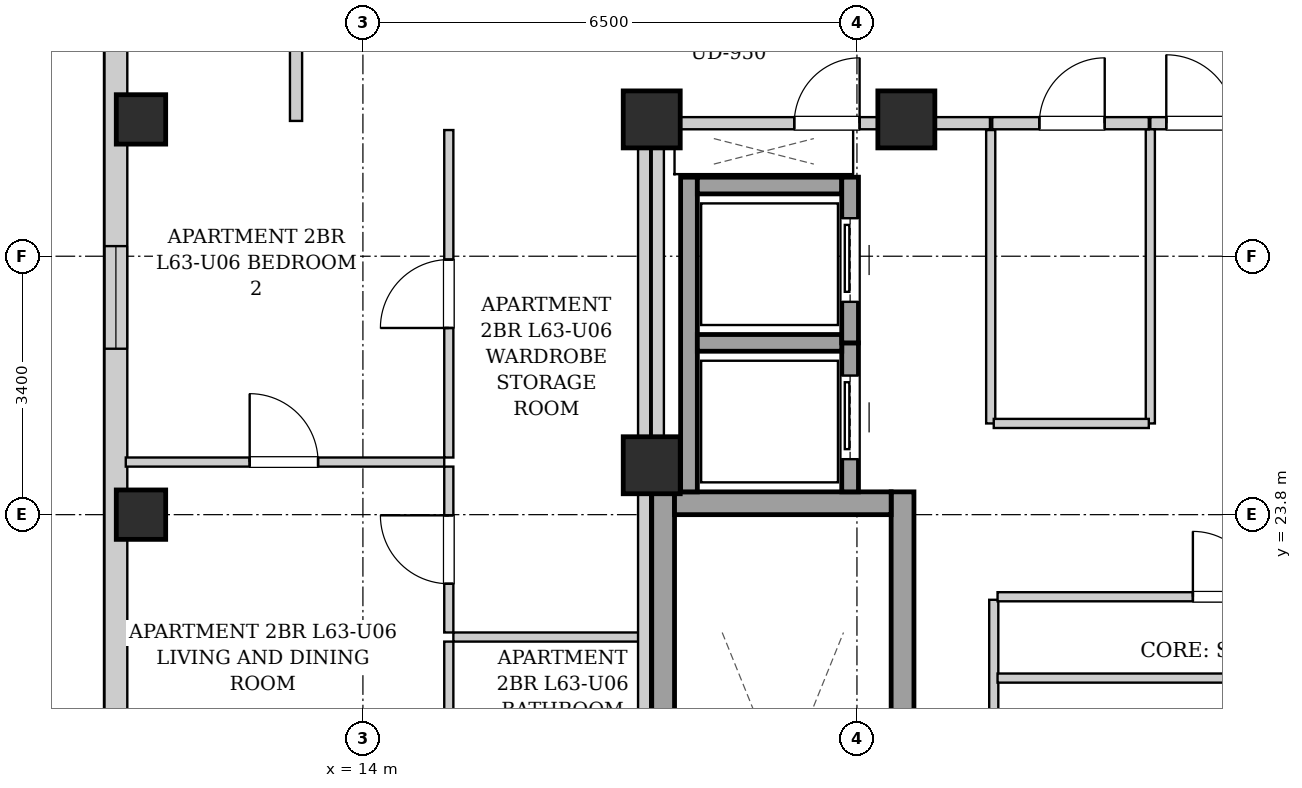
"""IFC4 building model, lengths in metres.
Left out: names, types, materials, properties, quantities, classifications, styles, units other than length and angle.
Written with IfcOpenShell. Run it as: python <this file> out.ifc"""

import sys

from ifc_helpers import new_model, si_unit, direction, frame, frame_2d, origin, origin_2d, place, context, subcontext, project, spatial, rectangle, extrude, element, fill, save


model = new_model("IFC4")
c1 = context("Model", 3, precision=1e-05, world=origin(), true_north=direction((0.0, 1.0)))
c2 = subcontext(c1, "Body", "Model", "MODEL_VIEW")
j1 = project(units=[si_unit("LENGTHUNIT", "METRE"), si_unit("PLANEANGLEUNIT", "RADIAN")], contexts=[c1])
p1 = place(None, origin())
s1 = spatial("IfcSite", under=j1, at=p1, CompositionType="ELEMENT")
p2 = place(p1, origin())
s2 = spatial("IfcBuilding", under=s1, at=p2, CompositionType="ELEMENT")
p3 = place(p2, frame((0.0, 0.0, 217.3)))
s3 = spatial("IfcBuildingStorey", under=s2, at=p3, CompositionType="ELEMENT", Elevation=217.3)
for number, where, z_axis, x_axis in (
    (1, (11.08, 23.8, 0.0), (0.0, 0.0, 1.0), (1.0, 0.0, 0.0)),
    (2, (11.08, 29.0, 0.0), (0.0, 0.0, 1.0), (1.0, 0.0, 0.0)),
):
    element("IfcColumn", number, at=place(p3, frame(where, z_axis=z_axis, x_axis=x_axis)), inside=s3, PredefinedType="COLUMN", context=c2, shape_type="SweptSolid", body=[
        extrude(rectangle(XDim=0.65, YDim=0.65, at=origin_2d()), origin(), (0.0, 0.0, 1.0), 3.4),
    ])
for number, where, z_axis, x_axis in (
    (3, (17.8, 29.0, 0.0), (0.0, 0.0, 1.0), (1.0, 0.0, 0.0)),
    (4, (21.15, 29.0, 0.0), (0.0, 0.0, 1.0), (1.0, 0.0, 0.0)),
    (5, (17.8, 24.45, 0.0), (0.0, 0.0, 1.0), (1.0, 0.0, 0.0)),
):
    element("IfcColumn", number, at=place(p3, frame(where, z_axis=z_axis, x_axis=x_axis)), inside=s3, PredefinedType="COLUMN", context=c2, shape_type="SweptSolid", body=[
        extrude(rectangle(XDim=0.75, YDim=0.75, at=origin_2d()), origin(), (0.0, 0.0, 1.0), 3.4),
    ])
p4 = place(p3, frame((10.75, 6.3, 0.0), z_axis=(0.0, 0.0, 1.0), x_axis=(0.0, 1.0, 0.0)))
e6 = element("IfcWall", 6, at=p4, inside=s3, PredefinedType="SOLIDWALL", context=c2, shape_type="SweptSolid", body=[
    extrude(rectangle(XDim=31.4, YDim=0.3, at=frame_2d((15.7, 0.0))), origin(), (0.0, 0.0, 1.0), 3.14),
])
p5 = place(p4, frame((1.504, 0.0, 0.55)))
e7 = element("IfcOpeningElement", 7, at=p5, cuts=e6, PredefinedType="OPENING", context=c2, shape_type="SweptSolid", body=[
    extrude(rectangle(XDim=1.35, YDim=1.2, at=frame_2d((0.675, 0.6))), frame((0.0, 0.16, 0.0), z_axis=(0.0, -1.0, 0.0), x_axis=(1.0, 0.0, 0.0)), (0.0, 0.0, 1.0), 0.32),
])
p6 = place(p4, frame((28.546, 0.0, 0.55)))
e8 = element("IfcOpeningElement", 8, at=p6, cuts=e6, PredefinedType="OPENING", context=c2, shape_type="SweptSolid", body=[
    extrude(rectangle(XDim=1.35, YDim=1.2, at=frame_2d((0.675, 0.6))), frame((0.0, 0.16, 0.0), z_axis=(0.0, -1.0, 0.0), x_axis=(1.0, 0.0, 0.0)), (0.0, 0.0, 1.0), 0.32),
])
p7 = place(p4, frame((10.367, 0.0, 0.55)))
e9 = element("IfcOpeningElement", 9, at=p7, cuts=e6, PredefinedType="OPENING", context=c2, shape_type="SweptSolid", body=[
    extrude(rectangle(XDim=1.35, YDim=1.2, at=frame_2d((0.675, 0.6))), frame((0.0, 0.16, 0.0), z_axis=(0.0, -1.0, 0.0), x_axis=(1.0, 0.0, 0.0)), (0.0, 0.0, 1.0), 0.32),
])
p8 = place(p4, frame((19.683, 0.0, 0.55)))
e10 = element("IfcOpeningElement", 10, at=p8, cuts=e6, PredefinedType="OPENING", context=c2, shape_type="SweptSolid", body=[
    extrude(rectangle(XDim=1.35, YDim=1.2, at=frame_2d((0.675, 0.6))), frame((0.0, 0.16, 0.0), z_axis=(0.0, -1.0, 0.0), x_axis=(1.0, 0.0, 0.0)), (0.0, 0.0, 1.0), 0.32),
])
for number, where, z_axis, x_axis in (
    (11, (17.95, 15.1, 0.0), (0.0, 0.0, 1.0), (0.0, 1.0, 0.0)),
    (12, (21.1, 15.1, 0.0), (0.0, 0.0, 1.0), (0.0, 1.0, 0.0)),
):
    element("IfcWall", number, at=place(p3, frame(where, z_axis=z_axis, x_axis=x_axis)), inside=s3, PredefinedType="SHEAR", context=c2, shape_type="SweptSolid", body=[
        extrude(rectangle(XDim=9.0, YDim=0.3, at=frame_2d((4.5, 0.0))), origin(), (0.0, 0.0, 1.0), 3.14),
    ])
p9 = place(p3, frame((18.1, 23.95, 0.0), z_axis=(0.0, 0.0, 1.0), x_axis=(1.0, 0.0, 0.0)))
e13 = element("IfcWall", 13, at=p9, inside=s3, PredefinedType="SHEAR", context=c2, shape_type="SweptSolid", body=[
    extrude(rectangle(XDim=2.85, YDim=0.3, at=frame_2d((1.425, 0.0))), origin(), (0.0, 0.0, 1.0), 3.14),
])
p10 = place(p3, frame((18.29, 24.1, 0.0), z_axis=(0.0, 0.0, 1.0), x_axis=(0.0, 1.0, 0.0)))
e14 = element("IfcWall", 14, at=p10, inside=s3, PredefinedType="SHEAR", context=c2, shape_type="SweptSolid", body=[
    extrude(rectangle(XDim=4.14, YDim=0.22, at=frame_2d((2.07, 0.0))), origin(), (0.0, 0.0, 1.0), 3.14),
])
p11 = place(p3, frame((20.41, 24.1, 0.0), z_axis=(0.0, 0.0, 1.0), x_axis=(0.0, 1.0, 0.0)))
e15 = element("IfcWall", 15, at=p11, inside=s3, PredefinedType="SHEAR", context=c2, shape_type="SweptSolid", body=[
    extrude(rectangle(XDim=1.96, YDim=0.22, at=frame_2d((0.98, 0.0))), origin(), (0.0, 0.0, 1.0), 3.14),
])
p12 = place(p11, frame((0.43, 0.0, 0.0)))
e16 = element("IfcOpeningElement", 16, at=p12, cuts=e15, PredefinedType="OPENING", context=c2, shape_type="SweptSolid", body=[
    extrude(rectangle(XDim=1.1, YDim=2.15, at=frame_2d((0.55, 1.075))), frame((0.0, 0.12, 0.0), z_axis=(0.0, -1.0, 0.0), x_axis=(1.0, 0.0, 0.0)), (0.0, 0.0, 1.0), 0.24),
])
for number, where, z_axis, x_axis in (
    (17, (18.4, 26.06, 0.0), (0.0, 0.0, 1.0), (1.0, 0.0, 0.0)),
    (18, (18.4, 28.13, 0.0), (0.0, 0.0, 1.0), (1.0, 0.0, 0.0)),
):
    element("IfcWall", number, at=place(p3, frame(where, z_axis=z_axis, x_axis=x_axis)), inside=s3, PredefinedType="SHEAR", context=c2, shape_type="SweptSolid", body=[
        extrude(rectangle(XDim=1.9, YDim=0.22, at=frame_2d((0.95, 0.0))), origin(), (0.0, 0.0, 1.0), 3.14),
    ])
p13 = place(p3, frame((20.41, 26.06, 0.0), z_axis=(0.0, 0.0, 1.0), x_axis=(0.0, 1.0, 0.0)))
e19 = element("IfcWall", 19, at=p13, inside=s3, PredefinedType="SHEAR", context=c2, shape_type="SweptSolid", body=[
    extrude(rectangle(XDim=2.18, YDim=0.22, at=frame_2d((1.09, 0.0))), origin(), (0.0, 0.0, 1.0), 3.14),
])
p14 = place(p13, frame((0.54, 0.0, 0.0)))
e20 = element("IfcOpeningElement", 20, at=p14, cuts=e19, PredefinedType="OPENING", context=c2, shape_type="SweptSolid", body=[
    extrude(rectangle(XDim=1.1, YDim=2.15, at=frame_2d((0.55, 1.075))), frame((0.0, 0.12, 0.0), z_axis=(0.0, -1.0, 0.0), x_axis=(1.0, 0.0, 0.0)), (0.0, 0.0, 1.0), 0.24),
])
p15 = place(p3, frame((17.88, 24.12, 0.0), z_axis=(0.0, 0.0, 1.0), x_axis=(0.0, 1.0, 0.0)))
e21 = element("IfcWall", 21, at=p15, inside=s3, PredefinedType="PARTITIONING", context=c2, shape_type="SweptSolid", body=[
    extrude(rectangle(XDim=4.76, YDim=0.16, at=frame_2d((2.38, 0.0))), origin(), (0.0, 0.0, 1.0), 2.475),
])
p16 = place(p3, frame((24.36, 28.95, 0.0), z_axis=(0.0, 0.0, 1.0), x_axis=(1.0, 0.0, 0.0)))
e22 = element("IfcWall", 22, at=p16, inside=s3, PredefinedType="PARTITIONING", context=c2, shape_type="SweptSolid", body=[
    extrude(rectangle(XDim=1.32, YDim=0.16, at=frame_2d((0.66, 0.0))), origin(), (0.0, 0.0, 1.0), 2.668),
])
p17 = place(p16, frame((0.21, 0.0, 0.0)))
e23 = element("IfcOpeningElement", 23, at=p17, cuts=e22, PredefinedType="OPENING", context=c2, shape_type="SweptSolid", body=[
    extrude(rectangle(XDim=0.9, YDim=2.05, at=frame_2d((0.45, 1.025))), frame((0.0, 0.09, 0.0), z_axis=(0.0, -1.0, 0.0), x_axis=(1.0, 0.0, 0.0)), (0.0, 0.0, 1.0), 0.18),
])
p18 = place(p3, frame((17.96, 28.95, 0.0), z_axis=(0.0, 0.0, 1.0), x_axis=(1.0, 0.0, 0.0)))
e24 = element("IfcWall", 24, at=p18, inside=s3, PredefinedType="PARTITIONING", context=c2, shape_type="SweptSolid", body=[
    extrude(rectangle(XDim=4.29, YDim=0.16, at=frame_2d((2.145, 0.0))), origin(), (0.0, 0.0, 1.0), 2.668),
])
p19 = place(p18, frame((1.715, 0.0, 0.0)))
e25 = element("IfcOpeningElement", 25, at=p19, cuts=e24, PredefinedType="OPENING", context=c2, shape_type="SweptSolid", body=[
    extrude(rectangle(XDim=0.86, YDim=2.05, at=frame_2d((0.43, 1.025))), frame((0.0, 0.09, 0.0), z_axis=(0.0, -1.0, 0.0), x_axis=(1.0, 0.0, 0.0)), (0.0, 0.0, 1.0), 0.18),
])
p20 = place(p3, frame((24.36, 25.0, 0.0), z_axis=(0.0, 0.0, 1.0), x_axis=(0.0, 1.0, 0.0)))
e26 = element("IfcWall", 26, at=p20, inside=s3, PredefinedType="PARTITIONING", context=c2, shape_type="SweptSolid", body=[
    extrude(rectangle(XDim=3.87, YDim=0.12, at=frame_2d((1.935, 0.0))), origin(), (0.0, 0.0, 1.0), 3.14),
])
p21 = place(p3, frame((22.26, 25.0, 0.0), z_axis=(0.0, 0.0, 1.0), x_axis=(0.0, 1.0, 0.0)))
e27 = element("IfcWall", 27, at=p21, inside=s3, PredefinedType="PARTITIONING", context=c2, shape_type="SweptSolid", body=[
    extrude(rectangle(XDim=3.86, YDim=0.12, at=frame_2d((1.93, 0.0))), origin(), (0.0, 0.0, 1.0), 3.14),
])
p22 = place(p3, frame((22.3, 25.0, 0.0), z_axis=(0.0, 0.0, 1.0), x_axis=(1.0, 0.0, 0.0)))
e28 = element("IfcWall", 28, at=p22, inside=s3, PredefinedType="PARTITIONING", context=c2, shape_type="SweptSolid", body=[
    extrude(rectangle(XDim=2.04, YDim=0.12, at=frame_2d((1.02, 0.0))), origin(), (0.0, 0.0, 1.0), 3.14),
])
p23 = place(p3, frame((22.28, 28.95, 0.0), z_axis=(0.0, 0.0, 1.0), x_axis=(1.0, 0.0, 0.0)))
e29 = element("IfcWall", 29, at=p23, inside=s3, PredefinedType="PARTITIONING", context=c2, shape_type="SweptSolid", body=[
    extrude(rectangle(XDim=2.06, YDim=0.16, at=frame_2d((1.03, 0.0))), origin(), (0.0, 0.0, 1.0), 2.668),
])
p24 = place(p23, frame((0.62, 0.0, 0.0)))
e30 = element("IfcOpeningElement", 30, at=p24, cuts=e29, PredefinedType="OPENING", context=c2, shape_type="SweptSolid", body=[
    extrude(rectangle(XDim=0.86, YDim=2.05, at=frame_2d((0.43, 1.025))), frame((0.0, 0.09, 0.0), z_axis=(0.0, -1.0, 0.0), x_axis=(1.0, 0.0, 0.0)), (0.0, 0.0, 1.0), 0.18),
])
p25 = place(p3, frame((22.3, 20.62, 0.0), z_axis=(0.0, 0.0, 1.0), x_axis=(0.0, 1.0, 0.0)))
e31 = element("IfcWall", 31, at=p25, inside=s3, PredefinedType="PARTITIONING", context=c2, shape_type="SweptSolid", body=[
    extrude(rectangle(XDim=2.06, YDim=0.12, at=frame_2d((1.03, 0.0))), origin(), (0.0, 0.0, 1.0), 3.14),
])
p26 = place(p3, frame((22.35, 21.65, 0.0), z_axis=(0.0, 0.0, 1.0), x_axis=(1.0, 0.0, 0.0)))
e32 = element("IfcWall", 32, at=p26, inside=s3, PredefinedType="PARTITIONING", context=c2, shape_type="SweptSolid", body=[
    extrude(rectangle(XDim=5.79, YDim=0.12, at=frame_2d((2.895, 0.0))), origin(), (0.0, 0.0, 1.0), 3.14),
])
p27 = place(p3, frame((22.35, 22.72, 0.0), z_axis=(0.0, 0.0, 1.0), x_axis=(1.0, 0.0, 0.0)))
e33 = element("IfcWall", 33, at=p27, inside=s3, PredefinedType="PARTITIONING", context=c2, shape_type="SweptSolid", body=[
    extrude(rectangle(XDim=7.27, YDim=0.12, at=frame_2d((3.635, 0.0))), origin(), (0.0, 0.0, 1.0), 3.14),
])
p28 = place(p27, frame((2.57, 0.0, 0.0)))
e34 = element("IfcOpeningElement", 34, at=p28, cuts=e33, PredefinedType="OPENING", context=c2, shape_type="SweptSolid", body=[
    extrude(rectangle(XDim=0.86, YDim=2.05, at=frame_2d((0.43, 1.025))), frame((0.0, 0.07, 0.0), z_axis=(0.0, -1.0, 0.0), x_axis=(1.0, 0.0, 0.0)), (0.0, 0.0, 1.0), 0.14),
])
p29 = place(p27, frame((6.06, 0.0, 0.0)))
e35 = element("IfcOpeningElement", 35, at=p29, cuts=e33, PredefinedType="OPENING", context=c2, shape_type="SweptSolid", body=[
    extrude(rectangle(XDim=0.86, YDim=2.05, at=frame_2d((0.43, 1.025))), frame((0.0, 0.07, 0.0), z_axis=(0.0, -1.0, 0.0), x_axis=(1.0, 0.0, 0.0)), (0.0, 0.0, 1.0), 0.14),
])
p30 = place(p3, frame((13.12, 28.98, 0.0), z_axis=(0.0, 0.0, 1.0), x_axis=(0.0, 1.0, 0.0)))
e36 = element("IfcWall", 36, at=p30, inside=s3, PredefinedType="PARTITIONING", context=c2, shape_type="SweptSolid", body=[
    extrude(rectangle(XDim=1.58, YDim=0.16, at=frame_2d((0.79, 0.0))), origin(), (0.0, 0.0, 1.0), 3.14),
])
p31 = place(p3, frame((15.19, 22.19, 0.0), z_axis=(0.0, 0.0, 1.0), x_axis=(1.0, 0.0, 0.0)))
e37 = element("IfcWall", 37, at=p31, inside=s3, PredefinedType="PARTITIONING", context=c2, shape_type="SweptSolid", body=[
    extrude(rectangle(XDim=2.45, YDim=0.12, at=frame_2d((1.225, 0.0))), origin(), (0.0, 0.0, 1.0), 3.14),
])
p32 = place(p3, frame((15.13, 22.25, 0.0), z_axis=(0.0, 0.0, 1.0), x_axis=(0.0, 1.0, 0.0)))
e38 = element("IfcWall", 38, at=p32, inside=s3, PredefinedType="PARTITIONING", context=c2, shape_type="SweptSolid", body=[
    extrude(rectangle(XDim=2.182, YDim=0.12, at=frame_2d((1.091, 0.0))), origin(), (0.0, 0.0, 1.0), 3.14),
])
p33 = place(p32, frame((0.641, 0.0, 0.0)))
e39 = element("IfcOpeningElement", 39, at=p33, cuts=e38, PredefinedType="OPENING", context=c2, shape_type="SweptSolid", body=[
    extrude(rectangle(XDim=0.9, YDim=2.05, at=frame_2d((0.45, 1.025))), frame((0.0, 0.07, 0.0), z_axis=(0.0, -1.0, 0.0), x_axis=(1.0, 0.0, 0.0)), (0.0, 0.0, 1.0), 0.14),
])
p34 = place(p3, frame((15.13, 24.552, 0.0), z_axis=(0.0, 0.0, 1.0), x_axis=(0.0, 1.0, 0.0)))
e40 = element("IfcWall", 40, at=p34, inside=s3, PredefinedType="PARTITIONING", context=c2, shape_type="SweptSolid", body=[
    extrude(rectangle(XDim=4.308, YDim=0.12, at=frame_2d((2.154, 0.0))), origin(), (0.0, 0.0, 1.0), 3.14),
])
p35 = place(p34, frame((1.704, 0.0, 0.0)))
e41 = element("IfcOpeningElement", 41, at=p35, cuts=e40, PredefinedType="OPENING", context=c2, shape_type="SweptSolid", body=[
    extrude(rectangle(XDim=0.9, YDim=2.05, at=frame_2d((0.45, 1.025))), frame((0.0, 0.07, 0.0), z_axis=(0.0, -1.0, 0.0), x_axis=(1.0, 0.0, 0.0)), (0.0, 0.0, 1.0), 0.14),
])
p36 = place(p3, frame((15.13, 19.83, 0.0), z_axis=(0.0, 0.0, 1.0), x_axis=(0.0, 1.0, 0.0)))
e42 = element("IfcWall", 42, at=p36, inside=s3, PredefinedType="PARTITIONING", context=c2, shape_type="SweptSolid", body=[
    extrude(rectangle(XDim=2.3, YDim=0.12, at=frame_2d((1.15, 0.0))), origin(), (0.0, 0.0, 1.0), 3.14),
])
p37 = place(p3, frame((10.88, 24.492, 0.0), z_axis=(0.0, 0.0, 1.0), x_axis=(1.0, 0.0, 0.0)))
e43 = element("IfcWall", 43, at=p37, inside=s3, PredefinedType="PARTITIONING", context=c2, shape_type="SweptSolid", body=[
    extrude(rectangle(XDim=4.19, YDim=0.12, at=frame_2d((2.095, 0.0))), origin(), (0.0, 0.0, 1.0), 2.878),
])
p38 = place(p37, frame((1.63, 0.0, 0.0)))
e44 = element("IfcOpeningElement", 44, at=p38, cuts=e43, PredefinedType="OPENING", context=c2, shape_type="SweptSolid", body=[
    extrude(rectangle(XDim=0.9, YDim=2.05, at=frame_2d((0.45, 1.025))), frame((0.0, 0.07, 0.0), z_axis=(0.0, -1.0, 0.0), x_axis=(1.0, 0.0, 0.0)), (0.0, 0.0, 1.0), 0.14),
])
p39 = place(p3, frame((17.7, 15.02, 0.0), z_axis=(0.0, 0.0, 1.0), x_axis=(0.0, 1.0, 0.0)))
e45 = element("IfcWall", 45, at=p39, inside=s3, PredefinedType="PARTITIONING", context=c2, shape_type="SweptSolid", body=[
    extrude(rectangle(XDim=13.98, YDim=0.16, at=frame_2d((6.99, 0.0))), origin(), (0.0, 0.0, 1.0), 2.475),
])
p40 = place(p12, origin())
e46 = element("IfcDoor", 46, at=p40, inside=s3, OperationType="SLIDING_TO_LEFT", PredefinedType="DOOR", context=c2, shape_type="SweptSolid", body=[
    extrude(rectangle(XDim=1.1, YDim=2.15, at=frame_2d((0.55, 1.075))), frame((0.0, 0.025, 0.0), z_axis=(0.0, -1.0, 0.0), x_axis=(1.0, 0.0, 0.0)), (0.0, 0.0, 1.0), 0.05),
])
fill(e16, e46)
p41 = place(p14, origin())
e47 = element("IfcDoor", 47, at=p41, inside=s3, OperationType="SLIDING_TO_LEFT", PredefinedType="DOOR", context=c2, shape_type="SweptSolid", body=[
    extrude(rectangle(XDim=1.1, YDim=2.15, at=frame_2d((0.55, 1.075))), frame((0.0, 0.025, 0.0), z_axis=(0.0, -1.0, 0.0), x_axis=(1.0, 0.0, 0.0)), (0.0, 0.0, 1.0), 0.05),
])
fill(e20, e47)
p42 = place(p17, origin())
e48 = element("IfcDoor", 48, at=p42, inside=s3, OperationType="SINGLE_SWING_LEFT", PredefinedType="DOOR", context=c2, shape_type="SweptSolid", body=[
    extrude(rectangle(XDim=0.9, YDim=2.05, at=frame_2d((0.45, 1.025))), frame((0.0, 0.025, 0.0), z_axis=(0.0, -1.0, 0.0), x_axis=(1.0, 0.0, 0.0)), (0.0, 0.0, 1.0), 0.05),
])
fill(e23, e48)
p43 = place(p19, origin())
e49 = element("IfcDoor", 49, at=p43, inside=s3, OperationType="SINGLE_SWING_RIGHT", PredefinedType="DOOR", context=c2, shape_type="SweptSolid", body=[
    extrude(rectangle(XDim=0.86, YDim=2.05, at=frame_2d((0.43, 1.025))), frame((0.0, 0.025, 0.0), z_axis=(0.0, -1.0, 0.0), x_axis=(1.0, 0.0, 0.0)), (0.0, 0.0, 1.0), 0.05),
])
fill(e25, e49)
p44 = place(p24, origin())
e50 = element("IfcDoor", 50, at=p44, inside=s3, OperationType="SINGLE_SWING_RIGHT", PredefinedType="DOOR", context=c2, shape_type="SweptSolid", body=[
    extrude(rectangle(XDim=0.86, YDim=2.05, at=frame_2d((0.43, 1.025))), frame((0.0, 0.025, 0.0), z_axis=(0.0, -1.0, 0.0), x_axis=(1.0, 0.0, 0.0)), (0.0, 0.0, 1.0), 0.05),
])
fill(e30, e50)
p45 = place(p28, origin())
e51 = element("IfcDoor", 51, at=p45, inside=s3, OperationType="SINGLE_SWING_LEFT", PredefinedType="DOOR", context=c2, shape_type="SweptSolid", body=[
    extrude(rectangle(XDim=0.86, YDim=2.05, at=frame_2d((0.43, 1.025))), frame((0.0, 0.025, 0.0), z_axis=(0.0, -1.0, 0.0), x_axis=(1.0, 0.0, 0.0)), (0.0, 0.0, 1.0), 0.05),
])
fill(e34, e51)
p46 = place(p33, origin())
e52 = element("IfcDoor", 52, at=p46, inside=s3, OperationType="SINGLE_SWING_RIGHT", PredefinedType="DOOR", context=c2, shape_type="SweptSolid", body=[
    extrude(rectangle(XDim=0.9, YDim=2.05, at=frame_2d((0.45, 1.025))), frame((0.0, 0.025, 0.0), z_axis=(0.0, -1.0, 0.0), x_axis=(1.0, 0.0, 0.0)), (0.0, 0.0, 1.0), 0.05),
])
fill(e39, e52)
p47 = place(p35, origin())
e53 = element("IfcDoor", 53, at=p47, inside=s3, OperationType="SINGLE_SWING_LEFT", PredefinedType="DOOR", context=c2, shape_type="SweptSolid", body=[
    extrude(rectangle(XDim=0.9, YDim=2.05, at=frame_2d((0.45, 1.025))), frame((0.0, 0.025, 0.0), z_axis=(0.0, -1.0, 0.0), x_axis=(1.0, 0.0, 0.0)), (0.0, 0.0, 1.0), 0.05),
])
fill(e41, e53)
p48 = place(p38, origin())
e54 = element("IfcDoor", 54, at=p48, inside=s3, OperationType="SINGLE_SWING_LEFT", PredefinedType="DOOR", context=c2, shape_type="SweptSolid", body=[
    extrude(rectangle(XDim=0.9, YDim=2.05, at=frame_2d((0.45, 1.025))), frame((0.0, 0.025, 0.0), z_axis=(0.0, -1.0, 0.0), x_axis=(1.0, 0.0, 0.0)), (0.0, 0.0, 1.0), 0.05),
])
fill(e44, e54)
p49 = place(p8, origin())
e55 = element("IfcWindow", 55, at=p49, inside=s3, PartitioningType="SINGLE_PANEL", PredefinedType="WINDOW", context=c2, shape_type="SweptSolid", body=[
    extrude(rectangle(XDim=1.35, YDim=1.2, at=frame_2d((0.675, 0.6))), frame((0.0, 0.03, 0.0), z_axis=(0.0, -1.0, 0.0), x_axis=(1.0, 0.0, 0.0)), (0.0, 0.0, 1.0), 0.06),
])
fill(e10, e55)
save(model, sys.argv[1])
